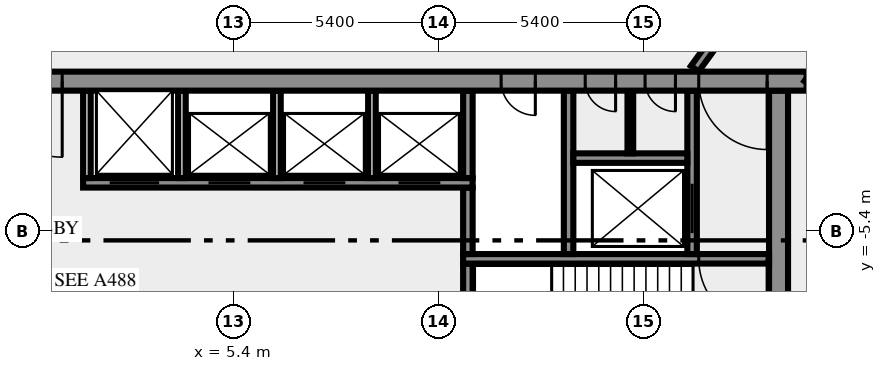
"""IFC4 building model, lengths in metres.
Left out: names, types, materials, properties, quantities, classifications, styles, units other than length and angle.
Written with IfcOpenShell. Run it as: python <this file> out.ifc"""

import sys

from ifc_helpers import new_model, si_unit, direction, frame, frame_2d, origin, place, context, subcontext, project, spatial, rectangle, extrude, element, fill, save


model = new_model("IFC4")
c1 = context("Model", 3, precision=1e-05, world=origin(), true_north=direction((0.0, 1.0)))
c2 = subcontext(c1, "Body", "Model", "MODEL_VIEW")
j1 = project(units=[si_unit("LENGTHUNIT", "METRE"), si_unit("PLANEANGLEUNIT", "RADIAN")], contexts=[c1])
p1 = place(None, origin())
s1 = spatial("IfcSite", under=j1, at=p1, CompositionType="ELEMENT")
p2 = place(p1, origin())
s2 = spatial("IfcBuilding", under=s1, at=p2, CompositionType="ELEMENT")
p3 = place(p2, frame((0.0, 0.0, 184.0)))
s3 = spatial("IfcBuildingStorey", under=s2, at=p3, CompositionType="ELEMENT", Elevation=184.0)
p4 = place(p3, frame((19.75, -10.5, 0.0), z_axis=(0.0, 0.0, 1.0), x_axis=(0.0, 1.0, 0.0)))
e1 = element("IfcWall", 1, at=p4, inside=s3, PredefinedType="SHEAR", context=c2, shape_type="SweptSolid", body=[
    extrude(rectangle(XDim=8.8, YDim=0.5, at=frame_2d((4.4, 0.0))), origin(), (0.0, 0.0, 1.0), 3.4),
])
p5 = place(p3, frame((11.575, -7.25, 0.0), z_axis=(0.0, 0.0, 1.0), x_axis=(0.0, 1.0, 0.0)))
e2 = element("IfcWall", 2, at=p5, inside=s3, PredefinedType="SHEAR", context=c2, shape_type="SweptSolid", body=[
    extrude(rectangle(XDim=1.0, YDim=0.25, at=frame_2d((0.5, 0.0))), origin(), (0.0, 0.0, 1.0), 3.4),
])
p6 = place(p3, frame((19.5, -6.125, 0.0), z_axis=(0.0, 0.0, 1.0), x_axis=(-1.0, 0.0, 0.0)))
e3 = element("IfcWall", 3, at=p6, inside=s3, PredefinedType="SHEAR", context=c2, shape_type="SweptSolid", body=[
    extrude(rectangle(XDim=8.05, YDim=0.25, at=frame_2d((4.025, 0.0))), origin(), (0.0, 0.0, 1.0), 3.4),
])
p7 = place(p6, frame((0.05, 0.0, 0.0)))
e4 = element("IfcOpeningElement", 4, at=p7, cuts=e3, PredefinedType="OPENING", context=c2, shape_type="SweptSolid", body=[
    extrude(rectangle(XDim=1.8, YDim=2.1, at=frame_2d((0.9, 1.05))), frame((0.0, 0.135, 0.0), z_axis=(0.0, -1.0, 0.0), x_axis=(1.0, 0.0, 0.0)), (0.0, 0.0, 1.0), 0.27),
])
p8 = place(p3, frame((11.575, -6.0, 0.0), z_axis=(0.0, 0.0, 1.0), x_axis=(0.0, 1.0, 0.0)))
e5 = element("IfcWall", 5, at=p8, inside=s3, PredefinedType="SHEAR", context=c2, shape_type="SweptSolid", body=[
    extrude(rectangle(XDim=1.75, YDim=0.25, at=frame_2d((0.875, 0.0))), origin(), (0.0, 0.0, 1.0), 3.4),
])
p9 = place(p3, frame((14.225, -6.0, 0.0), z_axis=(0.0, 0.0, 1.0), x_axis=(0.0, 1.0, 0.0)))
e6 = element("IfcWall", 6, at=p9, inside=s3, PredefinedType="SHEAR", context=c2, shape_type="SweptSolid", body=[
    extrude(rectangle(XDim=4.3, YDim=0.25, at=frame_2d((2.15, 0.0))), origin(), (0.0, 0.0, 1.0), 3.4),
])
p10 = place(p3, frame((17.475, -6.0, 0.0), z_axis=(0.0, 0.0, 1.0), x_axis=(0.0, 1.0, 0.0)))
e7 = element("IfcWall", 7, at=p10, inside=s3, PredefinedType="SHEAR", context=c2, shape_type="SweptSolid", body=[
    extrude(rectangle(XDim=4.3, YDim=0.25, at=frame_2d((2.15, 0.0))), origin(), (0.0, 0.0, 1.0), 3.4),
])
p11 = place(p10, frame((0.55, 0.0, 0.0)))
e8 = element("IfcOpeningElement", 8, at=p11, cuts=e7, PredefinedType="OPENING", context=c2, shape_type="SweptSolid", body=[
    extrude(rectangle(XDim=1.3, YDim=2.1, at=frame_2d((0.65, 1.05))), frame((0.0, 0.135, 0.0), z_axis=(0.0, -1.0, 0.0), x_axis=(1.0, 0.0, 0.0)), (0.0, 0.0, 1.0), 0.27),
])
p12 = place(p3, frame((1.45, -4.125, 0.0), z_axis=(0.0, 0.0, 1.0), x_axis=(1.0, 0.0, 0.0)))
e9 = element("IfcWall", 9, at=p12, inside=s3, PredefinedType="SHEAR", context=c2, shape_type="SweptSolid", body=[
    extrude(rectangle(XDim=10.25, YDim=0.25, at=frame_2d((5.125, 0.0))), origin(), (0.0, 0.0, 1.0), 3.4),
])
p13 = place(p12, frame((0.7, 0.0, 0.0)))
e10 = element("IfcOpeningElement", 10, at=p13, cuts=e9, PredefinedType="OPENING", context=c2, shape_type="SweptSolid", body=[
    extrude(rectangle(XDim=1.3, YDim=2.1, at=frame_2d((0.65, 1.05))), frame((0.0, 0.135, 0.0), z_axis=(0.0, -1.0, 0.0), x_axis=(1.0, 0.0, 0.0)), (0.0, 0.0, 1.0), 0.27),
])
p14 = place(p12, frame((3.3, 0.0, 0.0)))
e11 = element("IfcOpeningElement", 11, at=p14, cuts=e9, PredefinedType="OPENING", context=c2, shape_type="SweptSolid", body=[
    extrude(rectangle(XDim=1.1, YDim=2.1, at=frame_2d((0.55, 1.05))), frame((0.0, 0.135, 0.0), z_axis=(0.0, -1.0, 0.0), x_axis=(1.0, 0.0, 0.0)), (0.0, 0.0, 1.0), 0.27),
])
p15 = place(p12, frame((5.8, 0.0, 0.0)))
e12 = element("IfcOpeningElement", 12, at=p15, cuts=e9, PredefinedType="OPENING", context=c2, shape_type="SweptSolid", body=[
    extrude(rectangle(XDim=1.1, YDim=2.1, at=frame_2d((0.55, 1.05))), frame((0.0, 0.135, 0.0), z_axis=(0.0, -1.0, 0.0), x_axis=(1.0, 0.0, 0.0)), (0.0, 0.0, 1.0), 0.27),
])
p16 = place(p12, frame((8.3, 0.0, 0.0)))
e13 = element("IfcOpeningElement", 13, at=p16, cuts=e9, PredefinedType="OPENING", context=c2, shape_type="SweptSolid", body=[
    extrude(rectangle(XDim=1.1, YDim=2.1, at=frame_2d((0.55, 1.05))), frame((0.0, 0.135, 0.0), z_axis=(0.0, -1.0, 0.0), x_axis=(1.0, 0.0, 0.0)), (0.0, 0.0, 1.0), 0.27),
])
for number, where, z_axis, x_axis in (
    (14, (1.55, -4.0, 0.0), (0.0, 0.0, 1.0), (0.0, 1.0, 0.0)),
    (15, (4.05, -4.0, 0.0), (0.0, 0.0, 1.0), (0.0, 1.0, 0.0)),
    (16, (6.55, -4.0, 0.0), (0.0, 0.0, 1.0), (0.0, 1.0, 0.0)),
    (17, (9.05, -4.0, 0.0), (0.0, 0.0, 1.0), (0.0, 1.0, 0.0)),
):
    element("IfcWall", number, at=place(p3, frame(where, z_axis=z_axis, x_axis=x_axis)), inside=s3, PredefinedType="SOLIDWALL", context=c2, shape_type="SweptSolid", body=[
        extrude(rectangle(XDim=2.3, YDim=0.2, at=frame_2d((1.15, 0.0))), origin(), (0.0, 0.0, 1.0), 3.4),
    ])
p17 = place(p3, frame((11.575, -4.0, 0.0), z_axis=(0.0, 0.0, 1.0), x_axis=(0.0, 1.0, 0.0)))
e18 = element("IfcWall", 18, at=p17, inside=s3, PredefinedType="SHEAR", context=c2, shape_type="SweptSolid", body=[
    extrude(rectangle(XDim=2.3, YDim=0.25, at=frame_2d((1.15, 0.0))), origin(), (0.0, 0.0, 1.0), 3.4),
])
p18 = place(p3, frame((14.35, -3.475, 0.0), z_axis=(0.0, 0.0, 1.0), x_axis=(1.0, 0.0, 0.0)))
e19 = element("IfcWall", 19, at=p18, inside=s3, PredefinedType="SHEAR", context=c2, shape_type="SweptSolid", body=[
    extrude(rectangle(XDim=3.0, YDim=0.25, at=frame_2d((1.5, 0.0))), origin(), (0.0, 0.0, 1.0), 3.4),
])
p19 = place(p3, frame((15.85, -3.35, 0.0), z_axis=(0.0, 0.0, 1.0), x_axis=(0.0, 1.0, 0.0)))
e20 = element("IfcWall", 20, at=p19, inside=s3, PredefinedType="PARTITIONING", context=c2, shape_type="SweptSolid", body=[
    extrude(rectangle(XDim=1.65, YDim=0.15, at=frame_2d((0.825, 0.0))), origin(), (0.0, 0.0, 1.0), 3.4),
])
p20 = place(p3, frame((20.49, -1.45, 0.0), z_axis=(0.0, 0.0, 1.0), x_axis=(-1.0, 0.0, 0.0)))
e21 = element("IfcWall", 21, at=p20, inside=s3, PredefinedType="SHEAR", context=c2, shape_type="SweptSolid", body=[
    extrude(rectangle(XDim=40.98, YDim=0.5, at=frame_2d((20.49, 0.0))), origin(), (0.0, 0.0, 1.0), 3.4),
])
p21 = place(p20, frame((38.14, 0.0, 0.0)))
e22 = element("IfcOpeningElement", 22, at=p21, cuts=e21, PredefinedType="OPENING", context=c2, shape_type="SweptSolid", body=[
    extrude(rectangle(XDim=1.8, YDim=2.1, at=frame_2d((0.9, 1.05))), frame((0.0, 0.26, 0.0), z_axis=(0.0, -1.0, 0.0), x_axis=(1.0, 0.0, 0.0)), (0.0, 0.0, 1.0), 0.52),
])
p22 = place(p20, frame((35.89, 0.0, 0.0)))
e23 = element("IfcOpeningElement", 23, at=p22, cuts=e21, PredefinedType="OPENING", context=c2, shape_type="SweptSolid", body=[
    extrude(rectangle(XDim=0.9, YDim=2.1, at=frame_2d((0.45, 1.05))), frame((0.0, 0.26, 0.0), z_axis=(0.0, -1.0, 0.0), x_axis=(1.0, 0.0, 0.0)), (0.0, 0.0, 1.0), 0.52),
])
p23 = place(p20, frame((32.94, 0.0, 0.0)))
e24 = element("IfcOpeningElement", 24, at=p23, cuts=e21, PredefinedType="OPENING", context=c2, shape_type="SweptSolid", body=[
    extrude(rectangle(XDim=0.9, YDim=2.1, at=frame_2d((0.45, 1.05))), frame((0.0, 0.26, 0.0), z_axis=(0.0, -1.0, 0.0), x_axis=(1.0, 0.0, 0.0)), (0.0, 0.0, 1.0), 0.52),
])
p24 = place(p20, frame((30.802, 0.0, 0.0)))
e25 = element("IfcOpeningElement", 25, at=p24, cuts=e21, PredefinedType="OPENING", context=c2, shape_type="SweptSolid", body=[
    extrude(rectangle(XDim=0.9, YDim=2.1, at=frame_2d((0.45, 1.05))), frame((0.0, 0.26, 0.0), z_axis=(0.0, -1.0, 0.0), x_axis=(1.0, 0.0, 0.0)), (0.0, 0.0, 1.0), 0.52),
])
p25 = place(p20, frame((29.24, 0.0, 0.0)))
e26 = element("IfcOpeningElement", 26, at=p25, cuts=e21, PredefinedType="OPENING", context=c2, shape_type="SweptSolid", body=[
    extrude(rectangle(XDim=0.9, YDim=2.1, at=frame_2d((0.45, 1.05))), frame((0.0, 0.26, 0.0), z_axis=(0.0, -1.0, 0.0), x_axis=(1.0, 0.0, 0.0)), (0.0, 0.0, 1.0), 0.52),
])
p26 = place(p20, frame((27.39, 0.0, 0.0)))
e27 = element("IfcOpeningElement", 27, at=p26, cuts=e21, PredefinedType="OPENING", context=c2, shape_type="SweptSolid", body=[
    extrude(rectangle(XDim=0.9, YDim=2.1, at=frame_2d((0.45, 1.05))), frame((0.0, 0.26, 0.0), z_axis=(0.0, -1.0, 0.0), x_axis=(1.0, 0.0, 0.0)), (0.0, 0.0, 1.0), 0.52),
])
p27 = place(p20, frame((25.228, 0.0, 0.0)))
e28 = element("IfcOpeningElement", 28, at=p27, cuts=e21, PredefinedType="OPENING", context=c2, shape_type="SweptSolid", body=[
    extrude(rectangle(XDim=0.9, YDim=2.1, at=frame_2d((0.45, 1.05))), frame((0.0, 0.26, 0.0), z_axis=(0.0, -1.0, 0.0), x_axis=(1.0, 0.0, 0.0)), (0.0, 0.0, 1.0), 0.52),
])
p28 = place(p20, frame((19.59, 0.0, 0.0)))
e29 = element("IfcOpeningElement", 29, at=p28, cuts=e21, PredefinedType="OPENING", context=c2, shape_type="SweptSolid", body=[
    extrude(rectangle(XDim=2.0, YDim=2.1, at=frame_2d((1.0, 1.05))), frame((0.0, 0.26, 0.0), z_axis=(0.0, -1.0, 0.0), x_axis=(1.0, 0.0, 0.0)), (0.0, 0.0, 1.0), 0.52),
])
p29 = place(p20, frame((7.14, 0.0, 0.0)))
e30 = element("IfcOpeningElement", 30, at=p29, cuts=e21, PredefinedType="OPENING", context=c2, shape_type="SweptSolid", body=[
    extrude(rectangle(XDim=0.9, YDim=2.1, at=frame_2d((0.45, 1.05))), frame((0.0, 0.26, 0.0), z_axis=(0.0, -1.0, 0.0), x_axis=(1.0, 0.0, 0.0)), (0.0, 0.0, 1.0), 0.52),
])
p30 = place(p20, frame((5.028, 0.0, 0.0)))
e31 = element("IfcOpeningElement", 31, at=p30, cuts=e21, PredefinedType="OPENING", context=c2, shape_type="SweptSolid", body=[
    extrude(rectangle(XDim=0.8, YDim=2.1, at=frame_2d((0.4, 1.05))), frame((0.0, 0.26, 0.0), z_axis=(0.0, -1.0, 0.0), x_axis=(1.0, 0.0, 0.0)), (0.0, 0.0, 1.0), 0.52),
])
p31 = place(p20, frame((3.452, 0.0, 0.0)))
e32 = element("IfcOpeningElement", 32, at=p31, cuts=e21, PredefinedType="OPENING", context=c2, shape_type="SweptSolid", body=[
    extrude(rectangle(XDim=0.8, YDim=2.1, at=frame_2d((0.4, 1.05))), frame((0.0, 0.26, 0.0), z_axis=(0.0, -1.0, 0.0), x_axis=(1.0, 0.0, 0.0)), (0.0, 0.0, 1.0), 0.52),
])
p32 = place(p20, frame((1.04, 0.0, 0.0)))
e33 = element("IfcOpeningElement", 33, at=p32, cuts=e21, PredefinedType="OPENING", context=c2, shape_type="SweptSolid", body=[
    extrude(rectangle(XDim=1.8, YDim=2.1, at=frame_2d((0.9, 1.05))), frame((0.0, 0.26, 0.0), z_axis=(0.0, -1.0, 0.0), x_axis=(1.0, 0.0, 0.0)), (0.0, 0.0, 1.0), 0.52),
])
p33 = place(p3, frame((17.545, -1.125, 0.0), z_axis=(0.0, 0.0, 1.0), x_axis=(0.587791430994, 0.80901250525, 0.0)))
e34 = element("IfcWall", 34, at=p33, inside=s3, PredefinedType="SOLIDWALL", context=c2, shape_type="SweptSolid", body=[
    extrude(rectangle(XDim=24.703, YDim=0.25, at=frame_2d((12.352, 0.0))), origin(), (0.0, 0.0, 1.0), 3.4),
])
p34 = place(p33, frame((23.329, 0.0, 0.0)))
e35 = element("IfcOpeningElement", 35, at=p34, cuts=e34, PredefinedType="OPENING", context=c2, shape_type="SweptSolid", body=[
    extrude(rectangle(XDim=0.9, YDim=2.1, at=frame_2d((0.45, 1.05))), frame((0.0, 0.135, 0.0), z_axis=(0.0, -1.0, 0.0), x_axis=(1.0, 0.0, 0.0)), (0.0, 0.0, 1.0), 0.27),
])
p35 = place(p33, frame((3.442, 0.0, 0.0)))
e36 = element("IfcOpeningElement", 36, at=p35, cuts=e34, PredefinedType="OPENING", context=c2, shape_type="SweptSolid", body=[
    extrude(rectangle(XDim=1.2, YDim=2.1, at=frame_2d((0.6, 1.05))), frame((0.0, 0.135, 0.0), z_axis=(0.0, -1.0, 0.0), x_axis=(1.0, 0.0, 0.0)), (0.0, 0.0, 1.0), 0.27),
])
p36 = place(p3, frame((34.062, 17.101, 0.0), z_axis=(0.0, 0.0, 1.0), x_axis=(-0.58778129431, -0.809019870003, 0.0)))
e37 = element("IfcWall", 37, at=p36, inside=s3, PredefinedType="SOLIDWALL", context=c2, shape_type="SweptSolid", body=[
    extrude(rectangle(XDim=23.021, YDim=0.25, at=frame_2d((11.51, 0.0))), origin(), (0.0, 0.0, 1.0), 3.4),
])
p37 = place(p36, frame((20.737, 0.0, 0.0)))
e38 = element("IfcOpeningElement", 38, at=p37, cuts=e37, PredefinedType="OPENING", context=c2, shape_type="SweptSolid", body=[
    extrude(rectangle(XDim=1.8, YDim=2.1, at=frame_2d((0.9, 1.05))), frame((0.0, 0.135, 0.0), z_axis=(0.0, -1.0, 0.0), x_axis=(1.0, 0.0, 0.0)), (0.0, 0.0, 1.0), 0.27),
])
p38 = place(p36, frame((0.174, 0.0, 0.0)))
e39 = element("IfcOpeningElement", 39, at=p38, cuts=e37, PredefinedType="OPENING", context=c2, shape_type="SweptSolid", body=[
    extrude(rectangle(XDim=1.8, YDim=2.1, at=frame_2d((0.9, 1.05))), frame((0.0, 0.135, 0.0), z_axis=(0.0, -1.0, 0.0), x_axis=(1.0, 0.0, 0.0)), (0.0, 0.0, 1.0), 0.27),
])
p39 = place(p7, origin())
e40 = element("IfcDoor", 40, at=p39, inside=s3, OperationType="DOUBLE_DOOR_SINGLE_SWING", PredefinedType="DOOR", context=c2, shape_type="SweptSolid", body=[
    extrude(rectangle(XDim=1.8, YDim=2.1, at=frame_2d((0.9, 1.05))), frame((0.0, 0.025, 0.0), z_axis=(0.0, -1.0, 0.0), x_axis=(1.0, 0.0, 0.0)), (0.0, 0.0, 1.0), 0.05),
])
fill(e4, e40)
p40 = place(p11, origin())
e41 = element("IfcDoor", 41, at=p40, inside=s3, OperationType="DOUBLE_DOOR_SLIDING", PredefinedType="DOOR", context=c2, shape_type="SweptSolid", body=[
    extrude(rectangle(XDim=1.3, YDim=2.1, at=frame_2d((0.65, 1.05))), frame((0.0, 0.025, 0.0), z_axis=(0.0, -1.0, 0.0), x_axis=(1.0, 0.0, 0.0)), (0.0, 0.0, 1.0), 0.05),
])
fill(e8, e41)
p41 = place(p13, origin())
e42 = element("IfcDoor", 42, at=p41, inside=s3, OperationType="DOUBLE_DOOR_SLIDING", PredefinedType="DOOR", context=c2, shape_type="SweptSolid", body=[
    extrude(rectangle(XDim=1.3, YDim=2.1, at=frame_2d((0.65, 1.05))), frame((0.0, 0.025, 0.0), z_axis=(0.0, -1.0, 0.0), x_axis=(1.0, 0.0, 0.0)), (0.0, 0.0, 1.0), 0.05),
])
fill(e10, e42)
p42 = place(p14, origin())
e43 = element("IfcDoor", 43, at=p42, inside=s3, OperationType="DOUBLE_DOOR_SLIDING", PredefinedType="DOOR", context=c2, shape_type="SweptSolid", body=[
    extrude(rectangle(XDim=1.1, YDim=2.1, at=frame_2d((0.55, 1.05))), frame((0.0, 0.025, 0.0), z_axis=(0.0, -1.0, 0.0), x_axis=(1.0, 0.0, 0.0)), (0.0, 0.0, 1.0), 0.05),
])
fill(e11, e43)
p43 = place(p15, origin())
e44 = element("IfcDoor", 44, at=p43, inside=s3, OperationType="DOUBLE_DOOR_SLIDING", PredefinedType="DOOR", context=c2, shape_type="SweptSolid", body=[
    extrude(rectangle(XDim=1.1, YDim=2.1, at=frame_2d((0.55, 1.05))), frame((0.0, 0.025, 0.0), z_axis=(0.0, -1.0, 0.0), x_axis=(1.0, 0.0, 0.0)), (0.0, 0.0, 1.0), 0.05),
])
fill(e12, e44)
p44 = place(p16, origin())
e45 = element("IfcDoor", 45, at=p44, inside=s3, OperationType="DOUBLE_DOOR_SLIDING", PredefinedType="DOOR", context=c2, shape_type="SweptSolid", body=[
    extrude(rectangle(XDim=1.1, YDim=2.1, at=frame_2d((0.55, 1.05))), frame((0.0, 0.025, 0.0), z_axis=(0.0, -1.0, 0.0), x_axis=(1.0, 0.0, 0.0)), (0.0, 0.0, 1.0), 0.05),
])
fill(e13, e45)
p45 = place(p28, origin())
e46 = element("IfcDoor", 46, at=p45, inside=s3, OperationType="DOUBLE_DOOR_SINGLE_SWING", PredefinedType="DOOR", context=c2, shape_type="SweptSolid", body=[
    extrude(rectangle(XDim=2.0, YDim=2.1, at=frame_2d((1.0, 1.05))), frame((0.0, 0.025, 0.0), z_axis=(0.0, -1.0, 0.0), x_axis=(1.0, 0.0, 0.0)), (0.0, 0.0, 1.0), 0.05),
])
fill(e29, e46)
p46 = place(p29, origin())
e47 = element("IfcDoor", 47, at=p46, inside=s3, OperationType="SINGLE_SWING_LEFT", PredefinedType="DOOR", context=c2, shape_type="SweptSolid", body=[
    extrude(rectangle(XDim=0.9, YDim=2.1, at=frame_2d((0.45, 1.05))), frame((0.0, 0.025, 0.0), z_axis=(0.0, -1.0, 0.0), x_axis=(1.0, 0.0, 0.0)), (0.0, 0.0, 1.0), 0.05),
])
fill(e30, e47)
p47 = place(p30, origin())
e48 = element("IfcDoor", 48, at=p47, inside=s3, OperationType="SINGLE_SWING_LEFT", PredefinedType="DOOR", context=c2, shape_type="SweptSolid", body=[
    extrude(rectangle(XDim=0.8, YDim=2.1, at=frame_2d((0.4, 1.05))), frame((0.0, 0.025, 0.0), z_axis=(0.0, -1.0, 0.0), x_axis=(1.0, 0.0, 0.0)), (0.0, 0.0, 1.0), 0.05),
])
fill(e31, e48)
p48 = place(p31, origin())
e49 = element("IfcDoor", 49, at=p48, inside=s3, OperationType="SINGLE_SWING_LEFT", PredefinedType="DOOR", context=c2, shape_type="SweptSolid", body=[
    extrude(rectangle(XDim=0.8, YDim=2.1, at=frame_2d((0.4, 1.05))), frame((0.0, 0.025, 0.0), z_axis=(0.0, -1.0, 0.0), x_axis=(1.0, 0.0, 0.0)), (0.0, 0.0, 1.0), 0.05),
])
fill(e32, e49)
p49 = place(p32, origin())
e50 = element("IfcDoor", 50, at=p49, inside=s3, OperationType="DOUBLE_DOOR_SINGLE_SWING", PredefinedType="DOOR", context=c2, shape_type="SweptSolid", body=[
    extrude(rectangle(XDim=1.8, YDim=2.1, at=frame_2d((0.9, 1.05))), frame((0.0, 0.025, 0.0), z_axis=(0.0, -1.0, 0.0), x_axis=(1.0, 0.0, 0.0)), (0.0, 0.0, 1.0), 0.05),
])
fill(e33, e50)
save(model, sys.argv[1])
